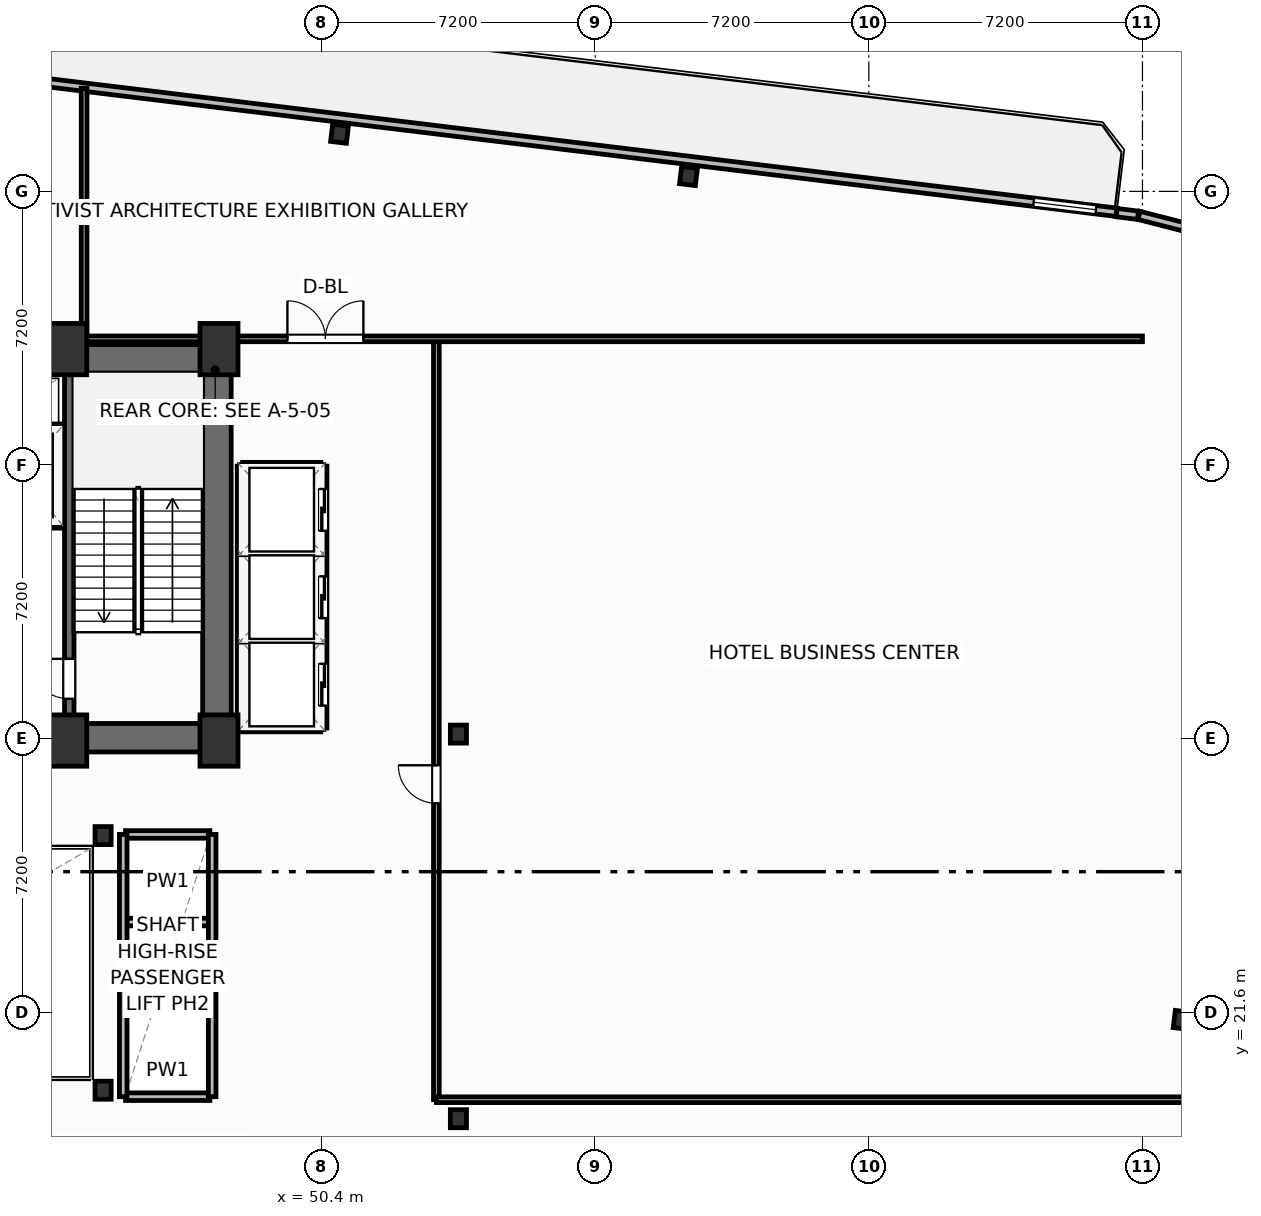
"""IFC4 building model, lengths in metres.
Left out: names, types, materials, properties, quantities, classifications, styles, units other than length and angle.
Written with IfcOpenShell. Run it as: python <this file> out.ifc"""

import sys

from ifc_helpers import new_model, si_unit, direction, frame, frame_2d, origin, origin_2d, place, context, subcontext, project, spatial, rectangle, i_section, extrude, element, fill, save


model = new_model("IFC4")
c1 = context("Model", 3, precision=1e-05, world=origin(), true_north=direction((0.0, 1.0)))
c2 = subcontext(c1, "Body", "Model", "MODEL_VIEW")
j1 = project(units=[si_unit("LENGTHUNIT", "METRE"), si_unit("PLANEANGLEUNIT", "RADIAN")], contexts=[c1])
p1 = place(None, origin())
s1 = spatial("IfcSite", under=j1, at=p1, CompositionType="ELEMENT")
p2 = place(p1, origin())
s2 = spatial("IfcBuilding", under=s1, at=p2, CompositionType="ELEMENT")
p3 = place(p2, frame((0.0, 0.0, 116.9)))
s3 = spatial("IfcBuildingStorey", under=s2, at=p3, CompositionType="ELEMENT", Elevation=116.9)
for number, where, z_axis, x_axis in (
    (1, (43.72, 28.75, 0.0), (0.0, 0.0, 1.0), (1.0, 0.0, 0.0)),
    (2, (47.7, 28.75, 0.0), (0.0, 0.0, 1.0), (1.0, 0.0, 0.0)),
    (3, (43.72, 39.05, 0.0), (0.0, 0.0, 1.0), (1.0, 0.0, 0.0)),
    (4, (47.7, 39.05, 0.0), (0.0, 0.0, 1.0), (1.0, 0.0, 0.0)),
):
    element("IfcColumn", number, at=place(p3, frame(where, z_axis=z_axis, x_axis=x_axis)), inside=s3, PredefinedType="COLUMN", context=c2, shape_type="SweptSolid", body=[
        extrude(rectangle(XDim=1.0, YDim=1.35, at=origin_2d()), origin(), (0.0, 0.0, 1.0), 4.8),
    ])
for number, where, z_axis, x_axis in (
    (5, (44.65, 19.55, 0.0), (0.0, 0.0, 1.0), (1.0, 0.0, 0.0)),
    (6, (44.65, 26.25, 0.0), (0.0, 0.0, 1.0), (1.0, 0.0, 0.0)),
    (7, (54.0, 18.8, 0.0), (0.0, 0.0, 1.0), (1.0, 0.0, 0.0)),
    (8, (54.0, 28.92, 0.0), (0.0, 0.0, 1.0), (1.0, 0.0, 0.0)),
):
    element("IfcColumn", number, at=place(p3, frame(where, z_axis=z_axis, x_axis=x_axis)), inside=s3, PredefinedType="COLUMN", context=c2, shape_type="SweptSolid", body=[
        extrude(i_section(OverallWidth=0.424, OverallDepth=0.474, WebThickness=0.048, FlangeThickness=0.077, FilletRadius=0.025, at=origin_2d()), origin(), (0.0, 0.0, 1.0), 4.8),
    ])
p4 = place(p3, frame((30.38, 38.795, 0.0), z_axis=(0.0, 0.0, 1.0), x_axis=(1.0, 0.0, 0.0)))
e9 = element("IfcWall", 9, at=p4, inside=s3, PredefinedType="SHEAR", context=c2, shape_type="SweptSolid", body=[
    extrude(rectangle(XDim=17.64, YDim=0.75, at=frame_2d((8.82, 0.0))), origin(), (0.0, 0.0, 1.0), 4.55),
])
p5 = place(p3, frame((47.645, 29.2, 0.0), z_axis=(0.0, 0.0, 1.0), x_axis=(0.0, 1.0, 0.0)))
e10 = element("IfcWall", 10, at=p5, inside=s3, PredefinedType="SHEAR", context=c2, shape_type="SweptSolid", body=[
    extrude(rectangle(XDim=9.22, YDim=0.75, at=frame_2d((4.61, 0.0))), origin(), (0.0, 0.0, 1.0), 4.55),
])
p6 = place(p3, frame((43.6, 28.825, 0.0), z_axis=(0.0, 0.0, 1.0), x_axis=(1.0, 0.0, 0.0)))
e11 = element("IfcWall", 11, at=p6, inside=s3, PredefinedType="SHEAR", context=c2, shape_type="SweptSolid", body=[
    extrude(rectangle(XDim=4.42, YDim=0.75, at=frame_2d((2.21, 0.0))), origin(), (0.0, 0.0, 1.0), 4.55),
])
p7 = place(p3, frame((34.8, 29.05, 0.0), z_axis=(0.0, 0.0, 1.0), x_axis=(1.0, 0.0, 0.0)))
e12 = element("IfcWall", 12, at=p7, inside=s3, PredefinedType="SHEAR", context=c2, shape_type="SweptSolid", body=[
    extrude(rectangle(XDim=8.8, YDim=0.3, at=frame_2d((4.4, 0.0))), origin(), (0.0, 0.0, 1.0), 4.55),
])
p8 = place(p7, frame((0.95, 0.0, 0.0)))
e13 = element("IfcOpeningElement", 13, at=p8, cuts=e12, PredefinedType="OPENING", context=c2, shape_type="SweptSolid", body=[
    extrude(rectangle(XDim=1.1, YDim=2.15, at=frame_2d((0.55, 1.075))), frame((0.0, 0.16, 0.0), z_axis=(0.0, -1.0, 0.0), x_axis=(1.0, 0.0, 0.0)), (0.0, 0.0, 1.0), 0.32),
])
p9 = place(p7, frame((6.75, 0.0, 0.0)))
e14 = element("IfcOpeningElement", 14, at=p9, cuts=e12, PredefinedType="OPENING", context=c2, shape_type="SweptSolid", body=[
    extrude(rectangle(XDim=1.1, YDim=2.15, at=frame_2d((0.55, 1.075))), frame((0.0, 0.16, 0.0), z_axis=(0.0, -1.0, 0.0), x_axis=(1.0, 0.0, 0.0)), (0.0, 0.0, 1.0), 0.32),
])
p10 = place(p7, frame((3.32, 0.0, 0.0)))
e15 = element("IfcOpeningElement", 15, at=p10, cuts=e12, PredefinedType="OPENING", context=c2, shape_type="SweptSolid", body=[
    extrude(rectangle(XDim=0.95, YDim=2.15, at=frame_2d((0.475, 1.075))), frame((0.0, 0.16, 0.0), z_axis=(0.0, -1.0, 0.0), x_axis=(1.0, 0.0, 0.0)), (0.0, 0.0, 1.0), 0.32),
])
p11 = place(p3, frame((43.76, 29.2, 0.0), z_axis=(0.0, 0.0, 1.0), x_axis=(0.0, 1.0, 0.0)))
e16 = element("IfcWall", 16, at=p11, inside=s3, PredefinedType="SHEAR", context=c2, shape_type="SweptSolid", body=[
    extrude(rectangle(XDim=9.22, YDim=0.25, at=frame_2d((4.61, 0.0))), origin(), (0.0, 0.0, 1.0), 4.55),
])
p12 = place(p11, frame((0.65, 0.0, 0.0)))
e17 = element("IfcOpeningElement", 17, at=p12, cuts=e16, PredefinedType="OPENING", context=c2, shape_type="SweptSolid", body=[
    extrude(rectangle(XDim=1.05, YDim=2.15, at=frame_2d((0.525, 1.075))), frame((0.0, 0.135, 0.0), z_axis=(0.0, -1.0, 0.0), x_axis=(1.0, 0.0, 0.0)), (0.0, 0.0, 1.0), 0.27),
])
for number, where, z_axis, x_axis in (
    (18, (73.044, 21.399, -0.32), (0.0, 0.0, 1.0), (0.993, -0.12, 0.0)),
    (19, (60.054, 43.603, -0.32), (0.0, 0.0, 1.0), (0.993, -0.12, 0.0)),
    (20, (50.872, 44.717, -0.32), (0.0, 0.0, 1.0), (0.993, -0.12, 0.0)),
):
    element("IfcColumn", number, at=place(p3, frame(where, z_axis=z_axis, x_axis=x_axis)), inside=s3, PredefinedType="COLUMN", context=c2, shape_type="SweptSolid", body=[
        extrude(i_section(OverallWidth=0.418, OverallDepth=0.455, WebThickness=0.042, FlangeThickness=0.068, FilletRadius=0.025, at=origin_2d()), origin(), (0.0, 0.0, 1.0), 5.12),
    ])
p13 = place(p3, frame((12.155, 49.823, 0.0), z_axis=(0.0, 0.0, 1.0), x_axis=(0.992732017356, -0.120345925214, 0.0)))
e21 = element("IfcWall", 21, at=p13, inside=s3, PredefinedType="SOLIDWALL", context=c2, shape_type="SweptSolid", body=[
    extrude(rectangle(XDim=59.6, YDim=0.22, at=frame_2d((29.8, 0.0))), origin(), (0.0, 0.0, 1.0), 3.83),
])
p14 = place(p13, frame((27.446, 0.0, 0.0)))
e22 = element("IfcOpeningElement", 22, at=p14, cuts=e21, PredefinedType="OPENING", context=c2, shape_type="SweptSolid", body=[
    extrude(rectangle(XDim=1.85, YDim=2.3, at=frame_2d((0.925, 1.15))), frame((0.0, 0.12, 0.0), z_axis=(0.0, -1.0, 0.0), x_axis=(1.0, 0.0, 0.0)), (0.0, 0.0, 1.0), 0.24),
])
p15 = place(p13, frame((0.55, 0.0, 0.75)))
e23 = element("IfcOpeningElement", 23, at=p15, cuts=e21, PredefinedType="OPENING", context=c2, shape_type="SweptSolid", body=[
    extrude(rectangle(XDim=1.65, YDim=1.65, at=frame_2d((0.825, 0.825))), frame((0.0, 0.12, 0.0), z_axis=(0.0, -1.0, 0.0), x_axis=(1.0, 0.0, 0.0)), (0.0, 0.0, 1.0), 0.24),
])
p16 = place(p13, frame((57.4, 0.0, 0.75)))
e24 = element("IfcOpeningElement", 24, at=p16, cuts=e21, PredefinedType="OPENING", context=c2, shape_type="SweptSolid", body=[
    extrude(rectangle(XDim=1.65, YDim=1.65, at=frame_2d((0.825, 0.825))), frame((0.0, 0.12, 0.0), z_axis=(0.0, -1.0, 0.0), x_axis=(1.0, 0.0, 0.0)), (0.0, 0.0, 1.0), 0.24),
])
p17 = place(p3, frame((73.074, 42.269, 0.0), z_axis=(0.0, 0.0, 1.0), x_axis=(-0.968511093208, 0.248970404534, 0.0)))
e25 = element("IfcWall", 25, at=p17, inside=s3, PredefinedType="SOLIDWALL", context=c2, shape_type="SweptSolid", body=[
    extrude(rectangle(XDim=1.204, YDim=0.22, at=frame_2d((0.602, 0.0))), origin(), (0.0, 0.0, 1.0), 3.83),
])
p18 = place(p3, frame((71.883, 42.572, 0.0), z_axis=(0.0, 0.0, 1.0), x_axis=(-0.992760251008, 0.120112797065, 0.0)))
e26 = element("IfcWall", 26, at=p18, inside=s3, PredefinedType="SOLIDWALL", context=c2, shape_type="SweptSolid", body=[
    extrude(rectangle(XDim=0.567, YDim=0.22, at=frame_2d((0.284, 0.0))), origin(), (0.0, 0.0, 1.0), 3.83),
])
p19 = place(p3, frame((53.42, 19.3, 0.0), z_axis=(0.0, 0.0, 1.0), x_axis=(0.0, 1.0, 0.0)))
e27 = element("IfcWall", 27, at=p19, inside=s3, PredefinedType="PARTITIONING", context=c2, shape_type="SweptSolid", body=[
    extrude(rectangle(XDim=20.02, YDim=0.15, at=frame_2d((10.01, 0.0))), origin(), (0.0, 0.0, 1.0), 4.55),
])
p20 = place(p19, frame((7.8, 0.0, 0.0)))
e28 = element("IfcOpeningElement", 28, at=p20, cuts=e27, PredefinedType="OPENING", context=c2, shape_type="SweptSolid", body=[
    extrude(rectangle(XDim=1.0, YDim=2.05, at=frame_2d((0.5, 1.025))), frame((0.0, 0.085, 0.0), z_axis=(0.0, -1.0, 0.0), x_axis=(1.0, 0.0, 0.0)), (0.0, 0.0, 1.0), 0.17),
])
p21 = place(p3, frame((53.42, 19.3, 0.0), z_axis=(0.0, 0.0, 1.0), x_axis=(1.0, 0.0, 0.0)))
e29 = element("IfcWall", 29, at=p21, inside=s3, PredefinedType="PARTITIONING", context=c2, shape_type="SweptSolid", body=[
    extrude(rectangle(XDim=20.329, YDim=0.15, at=frame_2d((10.165, 0.0))), origin(), (0.0, 0.0, 1.0), 3.762),
])
p22 = place(p3, frame((10.0, 39.32, 0.0), z_axis=(0.0, 0.0, 1.0), x_axis=(1.0, 0.0, 0.0)))
e30 = element("IfcWall", 30, at=p22, inside=s3, PredefinedType="PARTITIONING", context=c2, shape_type="SweptSolid", body=[
    extrude(rectangle(XDim=62.0, YDim=0.15, at=frame_2d((31.0, 0.0))), origin(), (0.0, 0.0, 1.0), 4.55),
])
p23 = place(p22, frame((15.6, 0.0, 0.0)))
e31 = element("IfcOpeningElement", 31, at=p23, cuts=e30, PredefinedType="OPENING", context=c2, shape_type="SweptSolid", body=[
    extrude(rectangle(XDim=1.0, YDim=2.05, at=frame_2d((0.5, 1.025))), frame((0.0, 0.085, 0.0), z_axis=(0.0, -1.0, 0.0), x_axis=(1.0, 0.0, 0.0)), (0.0, 0.0, 1.0), 0.17),
])
p24 = place(p22, frame((39.5, 0.0, 0.0)))
e32 = element("IfcOpeningElement", 32, at=p24, cuts=e30, PredefinedType="OPENING", context=c2, shape_type="SweptSolid", body=[
    extrude(rectangle(XDim=2.0, YDim=2.05, at=frame_2d((1.0, 1.025))), frame((0.0, 0.085, 0.0), z_axis=(0.0, -1.0, 0.0), x_axis=(1.0, 0.0, 0.0)), (0.0, 0.0, 1.0), 0.17),
])
p25 = place(p3, frame((44.15, 39.32, 0.0), z_axis=(0.0, 0.0, 1.0), x_axis=(0.0, 1.0, 0.0)))
e33 = element("IfcWall", 33, at=p25, inside=s3, PredefinedType="PARTITIONING", context=c2, shape_type="SweptSolid", body=[
    extrude(rectangle(XDim=6.594, YDim=0.15, at=frame_2d((3.297, 0.0))), origin(), (0.0, 0.0, 1.0), 4.55),
])
p26 = place(p3, frame((41.42, 34.44, 0.0), z_axis=(0.0, 0.0, 1.0), x_axis=(1.0, 0.0, 0.0)))
e34 = element("IfcWall", 34, at=p26, inside=s3, PredefinedType="PARTITIONING", context=c2, shape_type="SweptSolid", body=[
    extrude(rectangle(XDim=2.18, YDim=0.2, at=frame_2d((1.09, 0.0))), origin(), (0.0, 0.0, 1.0), 4.55),
])
p27 = place(p26, frame((0.42, 0.0, 0.0)))
e35 = element("IfcOpeningElement", 35, at=p27, cuts=e34, PredefinedType="OPENING", context=c2, shape_type="SweptSolid", body=[
    extrude(rectangle(XDim=1.2, YDim=2.2, at=frame_2d((0.6, 1.1))), frame((0.0, 0.11, 0.0), z_axis=(0.0, -1.0, 0.0), x_axis=(1.0, 0.0, 0.0)), (0.0, 0.0, 1.0), 0.22),
])
p28 = place(p3, frame((41.42, 36.98, 0.0), z_axis=(0.0, 0.0, 1.0), x_axis=(1.0, 0.0, 0.0)))
e36 = element("IfcWall", 36, at=p28, inside=s3, PredefinedType="PARTITIONING", context=c2, shape_type="SweptSolid", body=[
    extrude(rectangle(XDim=2.18, YDim=0.2, at=frame_2d((1.09, 0.0))), origin(), (0.0, 0.0, 1.0), 4.55),
])
for number, where, z_axis, x_axis in (
    (37, (48.32, 31.375, 0.0), (0.0, 0.0, 1.0), (1.0, 0.0, 0.0)),
    (38, (48.32, 33.675, 0.0), (0.0, 0.0, 1.0), (1.0, 0.0, 0.0)),
):
    element("IfcWall", number, at=place(p3, frame(where, z_axis=z_axis, x_axis=x_axis)), inside=s3, PredefinedType="PARTITIONING", context=c2, shape_type="SweptSolid", body=[
        extrude(rectangle(XDim=2.06, YDim=0.2, at=frame_2d((1.03, 0.0))), origin(), (0.0, 0.0, 1.0), 4.55),
    ])
p29 = place(p3, frame((48.32, 29.08, 0.0), z_axis=(0.0, 0.0, 1.0), x_axis=(1.0, 0.0, 0.0)))
e39 = element("IfcWall", 39, at=p29, inside=s3, PredefinedType="PARTITIONING", context=c2, shape_type="SweptSolid", body=[
    extrude(rectangle(XDim=2.06, YDim=0.2, at=frame_2d((1.03, 0.0))), origin(), (0.0, 0.0, 1.0), 3.762),
])
p30 = place(p3, frame((48.32, 35.97, 0.0), z_axis=(0.0, 0.0, 1.0), x_axis=(1.0, 0.0, 0.0)))
e40 = element("IfcWall", 40, at=p30, inside=s3, PredefinedType="PARTITIONING", context=c2, shape_type="SweptSolid", body=[
    extrude(rectangle(XDim=2.06, YDim=0.2, at=frame_2d((1.03, 0.0))), origin(), (0.0, 0.0, 1.0), 4.55),
])
p31 = place(p3, frame((48.28, 29.08, 0.0), z_axis=(0.0, 0.0, 1.0), x_axis=(0.0, 1.0, 0.0)))
e41 = element("IfcWall", 41, at=p31, inside=s3, PredefinedType="PARTITIONING", context=c2, shape_type="SweptSolid", body=[
    extrude(rectangle(XDim=6.89, YDim=0.2, at=frame_2d((3.445, 0.0))), origin(), (0.0, 0.0, 1.0), 4.55),
])
p32 = place(p3, frame((50.44, 29.08, 0.0), z_axis=(0.0, 0.0, 1.0), x_axis=(0.0, 1.0, 0.0)))
e42 = element("IfcWall", 42, at=p32, inside=s3, PredefinedType="PARTITIONING", context=c2, shape_type="SweptSolid", body=[
    extrude(rectangle(XDim=6.89, YDim=0.2, at=frame_2d((3.445, 0.0))), origin(), (0.0, 0.0, 1.0), 4.55),
])
p33 = place(p32, frame((0.59, 0.0, 0.0)))
e43 = element("IfcOpeningElement", 43, at=p33, cuts=e42, PredefinedType="OPENING", context=c2, shape_type="SweptSolid", body=[
    extrude(rectangle(XDim=1.1, YDim=2.15, at=frame_2d((0.55, 1.075))), frame((0.0, 0.11, 0.0), z_axis=(0.0, -1.0, 0.0), x_axis=(1.0, 0.0, 0.0)), (0.0, 0.0, 1.0), 0.22),
])
p34 = place(p32, frame((2.89, 0.0, 0.0)))
e44 = element("IfcOpeningElement", 44, at=p34, cuts=e42, PredefinedType="OPENING", context=c2, shape_type="SweptSolid", body=[
    extrude(rectangle(XDim=1.1, YDim=2.15, at=frame_2d((0.55, 1.075))), frame((0.0, 0.11, 0.0), z_axis=(0.0, -1.0, 0.0), x_axis=(1.0, 0.0, 0.0)), (0.0, 0.0, 1.0), 0.22),
])
p35 = place(p32, frame((5.19, 0.0, 0.0)))
e45 = element("IfcOpeningElement", 45, at=p35, cuts=e42, PredefinedType="OPENING", context=c2, shape_type="SweptSolid", body=[
    extrude(rectangle(XDim=1.1, YDim=2.15, at=frame_2d((0.55, 1.075))), frame((0.0, 0.11, 0.0), z_axis=(0.0, -1.0, 0.0), x_axis=(1.0, 0.0, 0.0)), (0.0, 0.0, 1.0), 0.22),
])
for number, where, z_axis, x_axis in (
    (46, (45.24, 21.675, 0.0), (0.0, 0.0, 1.0), (1.0, 0.0, 0.0)),
    (47, (45.24, 23.975, 0.0), (0.0, 0.0, 1.0), (1.0, 0.0, 0.0)),
):
    element("IfcWall", number, at=place(p3, frame(where, z_axis=z_axis, x_axis=x_axis)), inside=s3, PredefinedType="PARTITIONING", context=c2, shape_type="SweptSolid", body=[
        extrude(rectangle(XDim=2.22, YDim=0.2, at=frame_2d((1.11, 0.0))), origin(), (0.0, 0.0, 1.0), 4.55),
    ])
p36 = place(p3, frame((45.24, 19.38, 0.0), z_axis=(0.0, 0.0, 1.0), x_axis=(1.0, 0.0, 0.0)))
e48 = element("IfcWall", 48, at=p36, inside=s3, PredefinedType="PARTITIONING", context=c2, shape_type="SweptSolid", body=[
    extrude(rectangle(XDim=2.22, YDim=0.2, at=frame_2d((1.11, 0.0))), origin(), (0.0, 0.0, 1.0), 3.762),
])
p37 = place(p3, frame((45.24, 26.28, 0.0), z_axis=(0.0, 0.0, 1.0), x_axis=(1.0, 0.0, 0.0)))
e49 = element("IfcWall", 49, at=p37, inside=s3, PredefinedType="PARTITIONING", context=c2, shape_type="SweptSolid", body=[
    extrude(rectangle(XDim=2.22, YDim=0.2, at=frame_2d((1.11, 0.0))), origin(), (0.0, 0.0, 1.0), 4.55),
])
for number, where, z_axis, x_axis in (
    (50, (45.18, 19.38, 0.0), (0.0, 0.0, 1.0), (0.0, 1.0, 0.0)),
    (51, (47.52, 19.38, 0.0), (0.0, 0.0, 1.0), (0.0, 1.0, 0.0)),
):
    element("IfcWall", number, at=place(p3, frame(where, z_axis=z_axis, x_axis=x_axis)), inside=s3, PredefinedType="PARTITIONING", context=c2, shape_type="SweptSolid", body=[
        extrude(rectangle(XDim=6.9, YDim=0.2, at=frame_2d((3.45, 0.0))), origin(), (0.0, 0.0, 1.0), 4.55),
    ])
p38 = place(p16, origin())
e52 = element("IfcWindow", 52, at=p38, inside=s3, PartitioningType="SINGLE_PANEL", PredefinedType="WINDOW", context=c2, shape_type="SweptSolid", body=[
    extrude(rectangle(XDim=1.65, YDim=1.65, at=frame_2d((0.825, 0.825))), frame((0.0, 0.03, 0.0), z_axis=(0.0, -1.0, 0.0), x_axis=(1.0, 0.0, 0.0)), (0.0, 0.0, 1.0), 0.06),
])
fill(e24, e52)
p39 = place(p20, origin())
e53 = element("IfcDoor", 53, at=p39, inside=s3, OperationType="SINGLE_SWING_RIGHT", PredefinedType="DOOR", context=c2, shape_type="SweptSolid", body=[
    extrude(rectangle(XDim=1.0, YDim=2.05, at=frame_2d((0.5, 1.025))), frame((0.0, 0.025, 0.0), z_axis=(0.0, -1.0, 0.0), x_axis=(1.0, 0.0, 0.0)), (0.0, 0.0, 1.0), 0.05),
])
fill(e28, e53)
p40 = place(p24, origin())
e54 = element("IfcDoor", 54, at=p40, inside=s3, OperationType="DOUBLE_DOOR_SINGLE_SWING", PredefinedType="DOOR", context=c2, shape_type="SweptSolid", body=[
    extrude(rectangle(XDim=2.0, YDim=2.05, at=frame_2d((1.0, 1.025))), frame((0.0, 0.025, 0.0), z_axis=(0.0, -1.0, 0.0), x_axis=(1.0, 0.0, 0.0)), (0.0, 0.0, 1.0), 0.05),
])
fill(e32, e54)
p41 = place(p12, origin())
e55 = element("IfcDoor", 55, at=p41, inside=s3, OperationType="SINGLE_SWING_RIGHT", PredefinedType="DOOR", context=c2, shape_type="SweptSolid", body=[
    extrude(rectangle(XDim=1.05, YDim=2.15, at=frame_2d((0.525, 1.075))), frame((0.0, 0.025, 0.0), z_axis=(0.0, -1.0, 0.0), x_axis=(1.0, 0.0, 0.0)), (0.0, 0.0, 1.0), 0.05),
])
fill(e17, e55)
p42 = place(p33, origin())
e56 = element("IfcDoor", 56, at=p42, inside=s3, OperationType="SLIDING_TO_LEFT", PredefinedType="DOOR", context=c2, shape_type="SweptSolid", body=[
    extrude(rectangle(XDim=1.1, YDim=2.15, at=frame_2d((0.55, 1.075))), frame((0.0, 0.025, 0.0), z_axis=(0.0, -1.0, 0.0), x_axis=(1.0, 0.0, 0.0)), (0.0, 0.0, 1.0), 0.05),
])
fill(e43, e56)
p43 = place(p34, origin())
e57 = element("IfcDoor", 57, at=p43, inside=s3, OperationType="SLIDING_TO_LEFT", PredefinedType="DOOR", context=c2, shape_type="SweptSolid", body=[
    extrude(rectangle(XDim=1.1, YDim=2.15, at=frame_2d((0.55, 1.075))), frame((0.0, 0.025, 0.0), z_axis=(0.0, -1.0, 0.0), x_axis=(1.0, 0.0, 0.0)), (0.0, 0.0, 1.0), 0.05),
])
fill(e44, e57)
p44 = place(p35, origin())
e58 = element("IfcDoor", 58, at=p44, inside=s3, OperationType="SLIDING_TO_LEFT", PredefinedType="DOOR", context=c2, shape_type="SweptSolid", body=[
    extrude(rectangle(XDim=1.1, YDim=2.15, at=frame_2d((0.55, 1.075))), frame((0.0, 0.025, 0.0), z_axis=(0.0, -1.0, 0.0), x_axis=(1.0, 0.0, 0.0)), (0.0, 0.0, 1.0), 0.05),
])
fill(e45, e58)
save(model, sys.argv[1])
